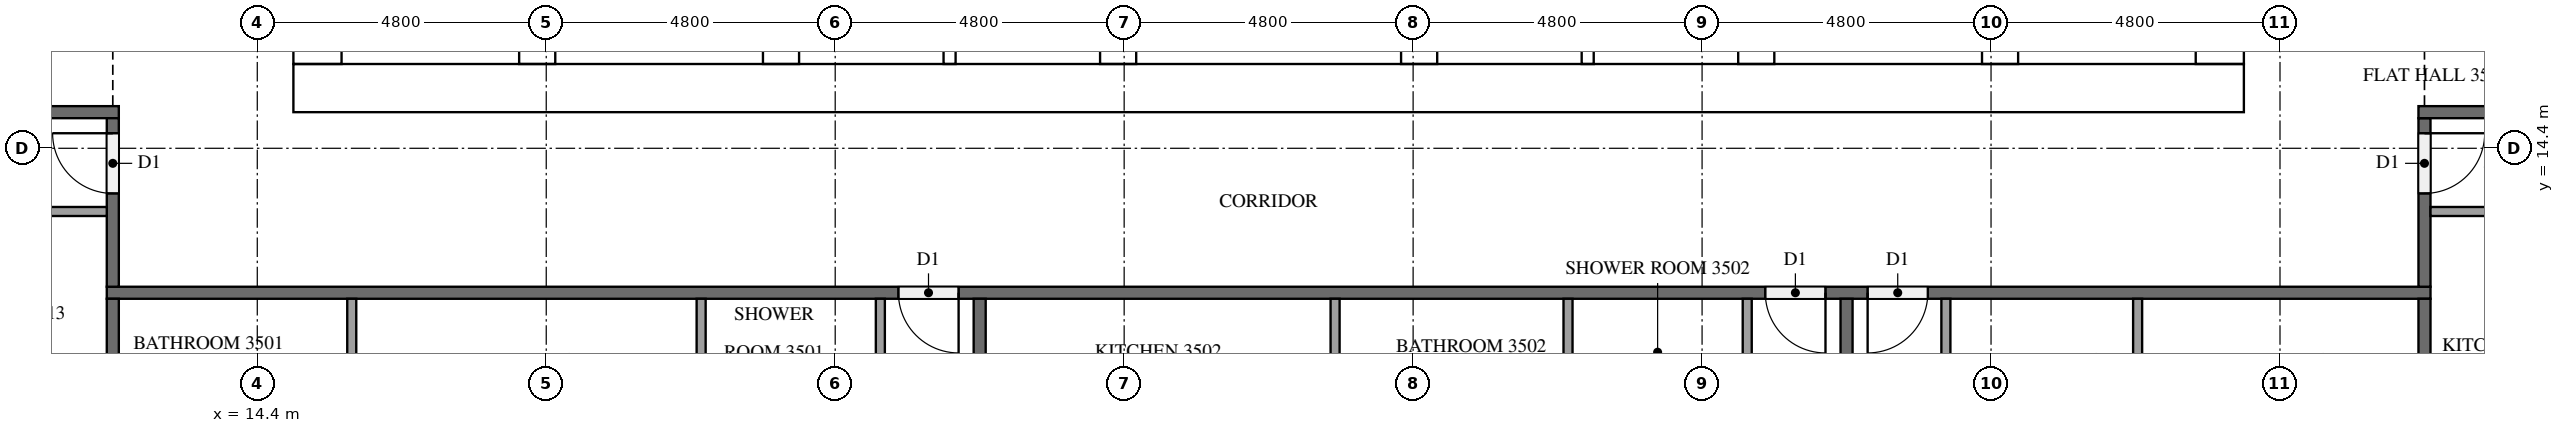
"""IFC4 building model, lengths in metres.
Left out: names, types, materials, properties, quantities, classifications, styles, units other than length and angle.
Written with IfcOpenShell. Run it as: python <this file> out.ifc"""

import sys

from ifc_helpers import new_model, si_unit, direction, frame, frame_2d, origin, place, context, subcontext, project, spatial, rectangle, extrude, element, fill, save


model = new_model("IFC4")
c1 = context("Model", 3, precision=1e-05, world=origin(), true_north=direction((0.0, 1.0)))
c2 = subcontext(c1, "Body", "Model", "MODEL_VIEW")
j1 = project(units=[si_unit("LENGTHUNIT", "METRE"), si_unit("PLANEANGLEUNIT", "RADIAN")], contexts=[c1])
p1 = place(None, origin())
s1 = spatial("IfcSite", under=j1, at=p1, CompositionType="ELEMENT")
p2 = place(p1, origin())
s2 = spatial("IfcBuilding", under=s1, at=p2, CompositionType="ELEMENT")
p3 = place(p2, frame((0.0, 0.0, 136.6)))
s3 = spatial("IfcBuildingStorey", under=s2, at=p3, CompositionType="ELEMENT", Elevation=136.6)
p4 = place(p3, frame((15.0, 15.4, 0.0), z_axis=(0.0, 0.0, 1.0), x_axis=(1.0, 0.0, 0.0)))
e1 = element("IfcWall", 1, at=p4, inside=s3, PredefinedType="SHEAR", context=c2, shape_type="SweptSolid", body=[
    extrude(rectangle(XDim=32.4, YDim=0.8, at=frame_2d((16.2, 0.0))), origin(), (0.0, 0.0, 1.0), 3.2),
])
p5 = place(p4, frame((15.3, 0.0, 0.0)))
e2 = element("IfcOpeningElement", 2, at=p5, cuts=e1, PredefinedType="OPENING", context=c2, shape_type="SweptSolid", body=[
    extrude(rectangle(XDim=1.8, YDim=2.1, at=frame_2d((0.9, 1.05))), frame((0.0, 0.41, 0.0), z_axis=(0.0, -1.0, 0.0), x_axis=(1.0, 0.0, 0.0)), (0.0, 0.0, 1.0), 0.82),
])
p6 = place(p3, frame((15.4, 15.8, 0.0), z_axis=(0.0, 0.0, 1.0), x_axis=(0.0, 1.0, 0.0)))
e3 = element("IfcWall", 3, at=p6, inside=s3, PredefinedType="SHEAR", context=c2, shape_type="SweptSolid", body=[
    extrude(rectangle(XDim=21.2, YDim=0.8, at=frame_2d((10.6, 0.0))), origin(), (0.0, 0.0, 1.0), 3.2),
])
p7 = place(p6, frame((4.96, 0.0, 0.0)))
e4 = element("IfcOpeningElement", 4, at=p7, cuts=e3, PredefinedType="OPENING", context=c2, shape_type="SweptSolid", body=[
    extrude(rectangle(XDim=1.2, YDim=2.1, at=frame_2d((0.6, 1.05))), frame((0.0, 0.41, 0.0), z_axis=(0.0, -1.0, 0.0), x_axis=(1.0, 0.0, 0.0)), (0.0, 0.0, 1.0), 0.82),
])
p8 = place(p3, frame((47.0, 15.8, 0.0), z_axis=(0.0, 0.0, 1.0), x_axis=(0.0, 1.0, 0.0)))
e5 = element("IfcWall", 5, at=p8, inside=s3, PredefinedType="SHEAR", context=c2, shape_type="SweptSolid", body=[
    extrude(rectangle(XDim=21.2, YDim=0.8, at=frame_2d((10.6, 0.0))), origin(), (0.0, 0.0, 1.0), 3.2),
])
p9 = place(p8, frame((10.3, 0.0, 0.0)))
e6 = element("IfcOpeningElement", 6, at=p9, cuts=e5, PredefinedType="OPENING", context=c2, shape_type="SweptSolid", body=[
    extrude(rectangle(XDim=1.2, YDim=2.1, at=frame_2d((0.6, 1.05))), frame((0.0, 0.41, 0.0), z_axis=(0.0, -1.0, 0.0), x_axis=(1.0, 0.0, 0.0)), (0.0, 0.0, 1.0), 0.82),
])
p10 = place(p3, frame((19.05, 15.8, 0.0), z_axis=(0.0, 0.0, 1.0), x_axis=(0.0, 1.0, 0.0)))
e7 = element("IfcWall", 7, at=p10, inside=s3, PredefinedType="SHEAR", context=c2, shape_type="SweptSolid", body=[
    extrude(rectangle(XDim=15.15, YDim=0.6, at=frame_2d((7.575, 0.0))), origin(), (0.0, 0.0, 1.0), 3.2),
])
p11 = place(p10, frame((9.65, 0.0, 0.0)))
e8 = element("IfcOpeningElement", 8, at=p11, cuts=e7, PredefinedType="OPENING", context=c2, shape_type="SweptSolid", body=[
    extrude(rectangle(XDim=1.1, YDim=2.1, at=frame_2d((0.55, 1.05))), frame((0.0, 0.31, 0.0), z_axis=(0.0, -1.0, 0.0), x_axis=(1.0, 0.0, 0.0)), (0.0, 0.0, 1.0), 0.62),
])
p12 = place(p10, frame((13.15, 0.0, 0.0)))
e9 = element("IfcOpeningElement", 9, at=p12, cuts=e7, PredefinedType="OPENING", context=c2, shape_type="SweptSolid", body=[
    extrude(rectangle(XDim=1.1, YDim=2.1, at=frame_2d((0.55, 1.05))), frame((0.0, 0.31, 0.0), z_axis=(0.0, -1.0, 0.0), x_axis=(1.0, 0.0, 0.0)), (0.0, 0.0, 1.0), 0.62),
])
p13 = place(p10, frame((0.4, 0.0, 0.0)))
e10 = element("IfcOpeningElement", 10, at=p13, cuts=e7, PredefinedType="OPENING", context=c2, shape_type="SweptSolid", body=[
    extrude(rectangle(XDim=1.2, YDim=2.1, at=frame_2d((0.6, 1.05))), frame((0.0, 0.31, 0.0), z_axis=(0.0, -1.0, 0.0), x_axis=(1.0, 0.0, 0.0)), (0.0, 0.0, 1.0), 0.62),
])
p14 = place(p3, frame((23.1, 15.8, 0.0), z_axis=(0.0, 0.0, 1.0), x_axis=(0.0, 1.0, 0.0)))
e11 = element("IfcWall", 11, at=p14, inside=s3, PredefinedType="SHEAR", context=c2, shape_type="SweptSolid", body=[
    extrude(rectangle(XDim=21.2, YDim=0.6, at=frame_2d((10.6, 0.0))), origin(), (0.0, 0.0, 1.0), 3.2),
])
p15 = place(p3, frame((39.3, 15.8, 0.0), z_axis=(0.0, 0.0, 1.0), x_axis=(0.0, 1.0, 0.0)))
e12 = element("IfcWall", 12, at=p15, inside=s3, PredefinedType="SHEAR", context=c2, shape_type="SweptSolid", body=[
    extrude(rectangle(XDim=8.45, YDim=0.6, at=frame_2d((4.225, 0.0))), origin(), (0.0, 0.0, 1.0), 3.2),
])
p16 = place(p3, frame((43.35, 15.8, 0.0), z_axis=(0.0, 0.0, 1.0), x_axis=(0.0, 1.0, 0.0)))
e13 = element("IfcWall", 13, at=p16, inside=s3, PredefinedType="SHEAR", context=c2, shape_type="SweptSolid", body=[
    extrude(rectangle(XDim=8.45, YDim=0.6, at=frame_2d((4.225, 0.0))), origin(), (0.0, 0.0, 1.0), 3.2),
])
p17 = place(p16, frame((0.4, 0.0, 0.0)))
e14 = element("IfcOpeningElement", 14, at=p17, cuts=e13, PredefinedType="OPENING", context=c2, shape_type="SweptSolid", body=[
    extrude(rectangle(XDim=1.2, YDim=2.1, at=frame_2d((0.6, 1.05))), frame((0.0, 0.31, 0.0), z_axis=(0.0, -1.0, 0.0), x_axis=(1.0, 0.0, 0.0)), (0.0, 0.0, 1.0), 0.62),
])
for number, where, z_axis, x_axis in (
    (15, (28.7, 15.8, 0.0), (0.0, 0.0, 1.0), (0.0, 1.0, 0.0)),
    (16, (33.7, 15.8, 0.0), (0.0, 0.0, 1.0), (0.0, 1.0, 0.0)),
):
    element("IfcWall", number, at=place(p3, frame(where, z_axis=z_axis, x_axis=x_axis)), inside=s3, PredefinedType="SHEAR", context=c2, shape_type="SweptSolid", body=[
        extrude(rectangle(XDim=2.65, YDim=0.6, at=frame_2d((1.325, 0.0))), origin(), (0.0, 0.0, 1.0), 3.2),
    ])
for number, where, z_axis, x_axis in (
    (17, (25.9, 15.8, 0.0), (0.0, 0.0, 1.0), (0.0, 1.0, 0.0)),
    (18, (36.5, 15.8, 0.0), (0.0, 0.0, 1.0), (0.0, 1.0, 0.0)),
):
    element("IfcWall", number, at=place(p3, frame(where, z_axis=z_axis, x_axis=x_axis)), inside=s3, PredefinedType="SOLIDWALL", context=c2, shape_type="SweptSolid", body=[
        extrude(rectangle(XDim=2.65, YDim=0.2, at=frame_2d((1.325, 0.0))), origin(), (0.0, 0.0, 1.0), 3.2),
    ])
p18 = place(p3, frame((50.5, 12.0, 0.0), z_axis=(0.0, 0.0, 1.0), x_axis=(-1.0, 0.0, 0.0)))
e19 = element("IfcWall", 19, at=p18, inside=s3, PredefinedType="PARTITIONING", context=c2, shape_type="SweptSolid", body=[
    extrude(rectangle(XDim=38.6, YDim=0.2, at=frame_2d((19.3, 0.0))), origin(), (0.0, 0.0, 1.0), 3.2),
])
p19 = place(p18, frame((24.45, 0.0, 0.0)))
e20 = element("IfcOpeningElement", 20, at=p19, cuts=e19, PredefinedType="OPENING", context=c2, shape_type="SweptSolid", body=[
    extrude(rectangle(XDim=1.0, YDim=2.1, at=frame_2d((0.5, 1.05))), frame((0.0, 0.11, 0.0), z_axis=(0.0, -1.0, 0.0), x_axis=(1.0, 0.0, 0.0)), (0.0, 0.0, 1.0), 0.22),
])
p20 = place(p18, frame((10.05, 0.0, 0.0)))
e21 = element("IfcOpeningElement", 21, at=p20, cuts=e19, PredefinedType="OPENING", context=c2, shape_type="SweptSolid", body=[
    extrude(rectangle(XDim=1.0, YDim=2.1, at=frame_2d((0.5, 1.05))), frame((0.0, 0.11, 0.0), z_axis=(0.0, -1.0, 0.0), x_axis=(1.0, 0.0, 0.0)), (0.0, 0.0, 1.0), 0.22),
])
p21 = place(p18, frame((8.35, 0.0, 0.0)))
e22 = element("IfcOpeningElement", 22, at=p21, cuts=e19, PredefinedType="OPENING", context=c2, shape_type="SweptSolid", body=[
    extrude(rectangle(XDim=1.0, YDim=2.1, at=frame_2d((0.5, 1.05))), frame((0.0, 0.11, 0.0), z_axis=(0.0, -1.0, 0.0), x_axis=(1.0, 0.0, 0.0)), (0.0, 0.0, 1.0), 0.22),
])
p22 = place(p3, frame((50.4, 14.9, 0.0), z_axis=(0.0, 0.0, 1.0), x_axis=(0.0, -1.0, 0.0)))
e23 = element("IfcWall", 23, at=p22, inside=s3, PredefinedType="PARTITIONING", context=c2, shape_type="SweptSolid", body=[
    extrude(rectangle(XDim=2.8, YDim=0.2, at=frame_2d((1.4, 0.0))), origin(), (0.0, 0.0, 1.0), 3.2),
])
p23 = place(p22, frame((0.25, 0.0, 0.0)))
e24 = element("IfcOpeningElement", 24, at=p23, cuts=e23, PredefinedType="OPENING", context=c2, shape_type="SweptSolid", body=[
    extrude(rectangle(XDim=1.0, YDim=2.1, at=frame_2d((0.5, 1.05))), frame((0.0, 0.11, 0.0), z_axis=(0.0, -1.0, 0.0), x_axis=(1.0, 0.0, 0.0)), (0.0, 0.0, 1.0), 0.22),
])
p24 = place(p3, frame((50.3, 15.0, 0.0), z_axis=(0.0, 0.0, 1.0), x_axis=(1.0, 0.0, 0.0)))
e25 = element("IfcWall", 25, at=p24, inside=s3, PredefinedType="PARTITIONING", context=c2, shape_type="SweptSolid", body=[
    extrude(rectangle(XDim=2.2, YDim=0.2, at=frame_2d((1.1, 0.0))), origin(), (0.0, 0.0, 1.0), 3.2),
])
p25 = place(p3, frame((9.9, 15.0, 0.0), z_axis=(0.0, 0.0, 1.0), x_axis=(1.0, 0.0, 0.0)))
e26 = element("IfcWall", 26, at=p25, inside=s3, PredefinedType="PARTITIONING", context=c2, shape_type="SweptSolid", body=[
    extrude(rectangle(XDim=2.2, YDim=0.2, at=frame_2d((1.1, 0.0))), origin(), (0.0, 0.0, 1.0), 3.2),
])
p26 = place(p3, frame((12.0, 12.1, 0.0), z_axis=(0.0, 0.0, 1.0), x_axis=(0.0, 1.0, 0.0)))
e27 = element("IfcWall", 27, at=p26, inside=s3, PredefinedType="PARTITIONING", context=c2, shape_type="SweptSolid", body=[
    extrude(rectangle(XDim=2.8, YDim=0.2, at=frame_2d((1.4, 0.0))), origin(), (0.0, 0.0, 1.0), 3.2),
])
p27 = place(p26, frame((1.55, 0.0, 0.0)))
e28 = element("IfcOpeningElement", 28, at=p27, cuts=e27, PredefinedType="OPENING", context=c2, shape_type="SweptSolid", body=[
    extrude(rectangle(XDim=1.0, YDim=2.1, at=frame_2d((0.5, 1.05))), frame((0.0, 0.11, 0.0), z_axis=(0.0, -1.0, 0.0), x_axis=(1.0, 0.0, 0.0)), (0.0, 0.0, 1.0), 0.22),
])
for number, where, z_axis, x_axis in (
    (29, (26.4, 11.9, 0.0), (0.0, 0.0, 1.0), (0.0, -1.0, 0.0)),
    (30, (12.0, 4.9, 0.0), (0.0, 0.0, 1.0), (0.0, 1.0, 0.0)),
    (31, (40.8, 11.9, 0.0), (0.0, 0.0, 1.0), (0.0, -1.0, 0.0)),
    (32, (50.4, 11.9, 0.0), (0.0, 0.0, 1.0), (0.0, -1.0, 0.0)),
):
    element("IfcWall", number, at=place(p3, frame(where, z_axis=z_axis, x_axis=x_axis)), inside=s3, PredefinedType="PARTITIONING", context=c2, shape_type="SweptSolid", body=[
        extrude(rectangle(XDim=7.0, YDim=0.2, at=frame_2d((3.5, 0.0))), origin(), (0.0, 0.0, 1.0), 3.2),
    ])
for number, where, z_axis, x_axis in (
    (33, (21.773, 11.9, 0.0), (0.0, 0.0, 1.0), (0.0, -1.0, 0.0)),
    (34, (15.969, 11.9, 0.0), (0.0, 0.0, 1.0), (0.0, -1.0, 0.0)),
):
    element("IfcWall", number, at=place(p3, frame(where, z_axis=z_axis, x_axis=x_axis)), inside=s3, PredefinedType="PARTITIONING", context=c2, shape_type="SweptSolid", body=[
        extrude(rectangle(XDim=2.075, YDim=0.15, at=frame_2d((1.038, 0.0))), origin(), (0.0, 0.0, 1.0), 3.2),
    ])
p28 = place(p3, frame((24.75, 11.9, 0.0), z_axis=(0.0, 0.0, 1.0), x_axis=(0.0, -1.0, 0.0)))
e35 = element("IfcWall", 35, at=p28, inside=s3, PredefinedType="PARTITIONING", context=c2, shape_type="SweptSolid", body=[
    extrude(rectangle(XDim=2.225, YDim=0.15, at=frame_2d((1.112, 0.0))), origin(), (0.0, 0.0, 1.0), 3.2),
])
for number, where, z_axis, x_axis in (
    (36, (36.173, 11.9, 0.0), (0.0, 0.0, 1.0), (0.0, -1.0, 0.0)),
    (37, (32.304, 11.9, 0.0), (0.0, 0.0, 1.0), (0.0, -1.0, 0.0)),
):
    element("IfcWall", number, at=place(p3, frame(where, z_axis=z_axis, x_axis=x_axis)), inside=s3, PredefinedType="PARTITIONING", context=c2, shape_type="SweptSolid", body=[
        extrude(rectangle(XDim=1.775, YDim=0.15, at=frame_2d((0.887, 0.0))), origin(), (0.0, 0.0, 1.0), 3.2),
    ])
p29 = place(p3, frame((39.15, 11.9, 0.0), z_axis=(0.0, 0.0, 1.0), x_axis=(0.0, -1.0, 0.0)))
e38 = element("IfcWall", 38, at=p29, inside=s3, PredefinedType="PARTITIONING", context=c2, shape_type="SweptSolid", body=[
    extrude(rectangle(XDim=1.925, YDim=0.15, at=frame_2d((0.962, 0.0))), origin(), (0.0, 0.0, 1.0), 3.2),
])
p30 = place(p3, frame((45.635, 11.9, 0.0), z_axis=(0.0, 0.0, 1.0), x_axis=(0.0, -1.0, 0.0)))
e39 = element("IfcWall", 39, at=p30, inside=s3, PredefinedType="PARTITIONING", context=c2, shape_type="SweptSolid", body=[
    extrude(rectangle(XDim=2.075, YDim=0.15, at=frame_2d((1.038, 0.0))), origin(), (0.0, 0.0, 1.0), 3.2),
])
p31 = place(p3, frame((42.45, 11.9, 0.0), z_axis=(0.0, 0.0, 1.0), x_axis=(0.0, -1.0, 0.0)))
e40 = element("IfcWall", 40, at=p31, inside=s3, PredefinedType="PARTITIONING", context=c2, shape_type="SweptSolid", body=[
    extrude(rectangle(XDim=2.225, YDim=0.15, at=frame_2d((1.112, 0.0))), origin(), (0.0, 0.0, 1.0), 3.2),
])
p32 = place(p3, frame((50.5, 13.35, 0.0), z_axis=(0.0, 0.0, 1.0), x_axis=(1.0, 0.0, 0.0)))
e41 = element("IfcWall", 41, at=p32, inside=s3, PredefinedType="PARTITIONING", context=c2, shape_type="SweptSolid", body=[
    extrude(rectangle(XDim=1.925, YDim=0.15, at=frame_2d((0.962, 0.0))), origin(), (0.0, 0.0, 1.0), 3.2),
])
p33 = place(p3, frame((11.9, 13.35, 0.0), z_axis=(0.0, 0.0, 1.0), x_axis=(-1.0, 0.0, 0.0)))
e42 = element("IfcWall", 42, at=p33, inside=s3, PredefinedType="PARTITIONING", context=c2, shape_type="SweptSolid", body=[
    extrude(rectangle(XDim=4.025, YDim=0.15, at=frame_2d((2.012, 0.0))), origin(), (0.0, 0.0, 1.0), 3.2),
])
p34 = place(p5, frame((1.8, 0.0, 0.0), z_axis=(0.0, 0.0, 1.0), x_axis=(-1.0, 0.0, 0.0)))
e43 = element("IfcDoor", 43, at=p34, inside=s3, OperationType="DOUBLE_DOOR_SINGLE_SWING", PredefinedType="DOOR", context=c2, shape_type="SweptSolid", body=[
    extrude(rectangle(XDim=1.8, YDim=2.1, at=frame_2d((0.9, 1.05))), frame((0.0, 0.025, 0.0), z_axis=(0.0, -1.0, 0.0), x_axis=(1.0, 0.0, 0.0)), (0.0, 0.0, 1.0), 0.05),
])
fill(e2, e43)
p35 = place(p19, origin())
e44 = element("IfcDoor", 44, at=p35, inside=s3, OperationType="SINGLE_SWING_LEFT", PredefinedType="DOOR", context=c2, shape_type="SweptSolid", body=[
    extrude(rectangle(XDim=1.0, YDim=2.1, at=frame_2d((0.5, 1.05))), frame((0.0, 0.025, 0.0), z_axis=(0.0, -1.0, 0.0), x_axis=(1.0, 0.0, 0.0)), (0.0, 0.0, 1.0), 0.05),
])
fill(e20, e44)
p36 = place(p20, origin())
e45 = element("IfcDoor", 45, at=p36, inside=s3, OperationType="SINGLE_SWING_LEFT", PredefinedType="DOOR", context=c2, shape_type="SweptSolid", body=[
    extrude(rectangle(XDim=1.0, YDim=2.1, at=frame_2d((0.5, 1.05))), frame((0.0, 0.025, 0.0), z_axis=(0.0, -1.0, 0.0), x_axis=(1.0, 0.0, 0.0)), (0.0, 0.0, 1.0), 0.05),
])
fill(e21, e45)
p37 = place(p21, origin())
e46 = element("IfcDoor", 46, at=p37, inside=s3, OperationType="SINGLE_SWING_RIGHT", PredefinedType="DOOR", context=c2, shape_type="SweptSolid", body=[
    extrude(rectangle(XDim=1.0, YDim=2.1, at=frame_2d((0.5, 1.05))), frame((0.0, 0.025, 0.0), z_axis=(0.0, -1.0, 0.0), x_axis=(1.0, 0.0, 0.0)), (0.0, 0.0, 1.0), 0.05),
])
fill(e22, e46)
p38 = place(p23, origin())
e47 = element("IfcDoor", 47, at=p38, inside=s3, OperationType="SINGLE_SWING_LEFT", PredefinedType="DOOR", context=c2, shape_type="SweptSolid", body=[
    extrude(rectangle(XDim=1.0, YDim=2.1, at=frame_2d((0.5, 1.05))), frame((0.0, 0.025, 0.0), z_axis=(0.0, -1.0, 0.0), x_axis=(1.0, 0.0, 0.0)), (0.0, 0.0, 1.0), 0.05),
])
fill(e24, e47)
p39 = place(p27, origin())
e48 = element("IfcDoor", 48, at=p39, inside=s3, OperationType="SINGLE_SWING_RIGHT", PredefinedType="DOOR", context=c2, shape_type="SweptSolid", body=[
    extrude(rectangle(XDim=1.0, YDim=2.1, at=frame_2d((0.5, 1.05))), frame((0.0, 0.025, 0.0), z_axis=(0.0, -1.0, 0.0), x_axis=(1.0, 0.0, 0.0)), (0.0, 0.0, 1.0), 0.05),
])
fill(e28, e48)
save(model, sys.argv[1])
